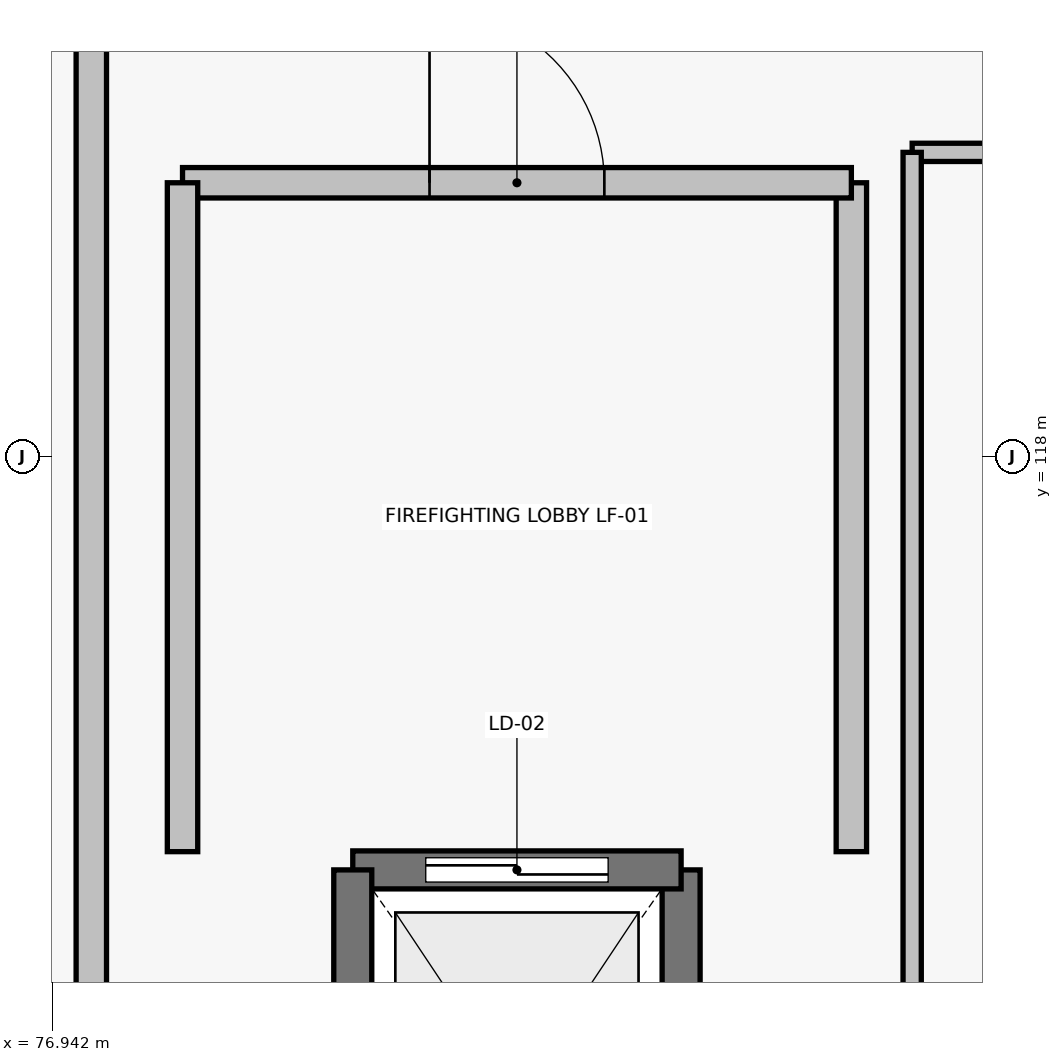
"""IFC4 building model, lengths in metres.
Left out: names, types, materials, properties, quantities, classifications, styles, units other than length and angle.
Written with IfcOpenShell. Run it as: python <this file> out.ifc"""

import sys

from ifc_helpers import new_model, si_unit, direction, frame, frame_2d, origin, place, context, subcontext, project, spatial, rectangle, extrude, element, fill, save


model = new_model("IFC4")
c1 = context("Model", 3, precision=1e-05, world=origin(), true_north=direction((0.0, 1.0)))
c2 = subcontext(c1, "Body", "Model", "MODEL_VIEW")
j1 = project(units=[si_unit("LENGTHUNIT", "METRE"), si_unit("PLANEANGLEUNIT", "RADIAN")], contexts=[c1])
p1 = place(None, origin())
s1 = spatial("IfcSite", under=j1, at=p1, CompositionType="ELEMENT")
p2 = place(p1, origin())
s2 = spatial("IfcBuilding", under=s1, at=p2, CompositionType="ELEMENT")
p3 = place(p2, origin())
s3 = spatial("IfcBuildingStorey", under=s2, at=p3, CompositionType="ELEMENT", Elevation=0.0)
p4 = place(p3, frame((81.08, 112.32, 0.0), z_axis=(0.0, 0.0, 1.0), x_axis=(0.0, 1.0, 0.0)))
e1 = element("IfcWall", 1, at=p4, inside=s3, PredefinedType="SHEAR", context=c2, shape_type="SweptSolid", body=[
    extrude(rectangle(XDim=2.96, YDim=0.25, at=frame_2d((1.48, 0.0))), origin(), (0.0, 0.0, 1.0), 5.16),
])
p5 = place(p3, frame((81.08, 115.28, 0.0), z_axis=(0.0, 0.0, 1.0), x_axis=(-1.0, 0.0, 0.0)))
e2 = element("IfcWall", 2, at=p5, inside=s3, PredefinedType="SHEAR", context=c2, shape_type="SweptSolid", body=[
    extrude(rectangle(XDim=2.16, YDim=0.25, at=frame_2d((1.08, 0.0))), origin(), (0.0, 0.0, 1.0), 5.16),
])
p6 = place(p5, frame((0.48, 0.0, 0.0)))
e3 = element("IfcOpeningElement", 3, at=p6, cuts=e2, PredefinedType="OPENING", context=c2, shape_type="SweptSolid", body=[
    extrude(rectangle(XDim=1.2, YDim=2.2, at=frame_2d((0.6, 1.1))), frame((0.0, 0.135, 0.0), z_axis=(0.0, -1.0, 0.0), x_axis=(1.0, 0.0, 0.0)), (0.0, 0.0, 1.0), 0.27),
])
p7 = place(p3, frame((78.92, 115.28, 0.0), z_axis=(0.0, 0.0, 1.0), x_axis=(0.0, -1.0, 0.0)))
e4 = element("IfcWall", 4, at=p7, inside=s3, PredefinedType="SHEAR", context=c2, shape_type="SweptSolid", body=[
    extrude(rectangle(XDim=2.96, YDim=0.25, at=frame_2d((1.48, 0.0))), origin(), (0.0, 0.0, 1.0), 5.16),
])
p8 = place(p3, frame((82.2, 115.4, 0.0), z_axis=(0.0, 0.0, 1.0), x_axis=(0.0, 1.0, 0.0)))
e5 = element("IfcWall", 5, at=p8, inside=s3, PredefinedType="PARTITIONING", context=c2, shape_type="SweptSolid", body=[
    extrude(rectangle(XDim=4.4, YDim=0.2, at=frame_2d((2.2, 0.0))), origin(), (0.0, 0.0, 1.0), 5.16),
])
p9 = place(p3, frame((82.2, 119.8, 0.0), z_axis=(0.0, 0.0, 1.0), x_axis=(-1.0, 0.0, 0.0)))
e6 = element("IfcWall", 6, at=p9, inside=s3, PredefinedType="PARTITIONING", context=c2, shape_type="SweptSolid", body=[
    extrude(rectangle(XDim=4.4, YDim=0.2, at=frame_2d((2.2, 0.0))), origin(), (0.0, 0.0, 1.0), 5.16),
])
p10 = place(p9, frame((1.625, 0.0, 0.0)))
e7 = element("IfcOpeningElement", 7, at=p10, cuts=e6, PredefinedType="OPENING", context=c2, shape_type="SweptSolid", body=[
    extrude(rectangle(XDim=1.15, YDim=2.2, at=frame_2d((0.575, 1.1))), frame((0.0, 0.11, 0.0), z_axis=(0.0, -1.0, 0.0), x_axis=(1.0, 0.0, 0.0)), (0.0, 0.0, 1.0), 0.22),
])
p11 = place(p3, frame((77.8, 119.8, 0.0), z_axis=(0.0, 0.0, 1.0), x_axis=(0.0, -1.0, 0.0)))
e8 = element("IfcWall", 8, at=p11, inside=s3, PredefinedType="PARTITIONING", context=c2, shape_type="SweptSolid", body=[
    extrude(rectangle(XDim=4.4, YDim=0.2, at=frame_2d((2.2, 0.0))), origin(), (0.0, 0.0, 1.0), 4.795),
])
p12 = place(p3, frame((77.2, 109.6, 0.0), z_axis=(0.0, 0.0, 1.0), x_axis=(0.0, 1.0, 0.0)))
e9 = element("IfcWall", 9, at=p12, inside=s3, PredefinedType="PARTITIONING", context=c2, shape_type="SweptSolid", body=[
    extrude(rectangle(XDim=23.38, YDim=0.2, at=frame_2d((11.69, 0.0))), origin(), (0.0, 0.0, 1.0), 4.795),
])
p13 = place(p12, frame((11.2, 0.0, 0.0)))
e10 = element("IfcOpeningElement", 10, at=p13, cuts=e9, PredefinedType="OPENING", context=c2, shape_type="SweptSolid", body=[
    extrude(rectangle(XDim=1.4, YDim=2.2, at=frame_2d((0.7, 1.1))), frame((0.0, 0.11, 0.0), z_axis=(0.0, -1.0, 0.0), x_axis=(1.0, 0.0, 0.0)), (0.0, 0.0, 1.0), 0.22),
])
p14 = place(p3, frame((89.8, 120.0, 0.0), z_axis=(0.0, 0.0, 1.0), x_axis=(-1.0, 0.0, 0.0)))
e11 = element("IfcWall", 11, at=p14, inside=s3, PredefinedType="PARTITIONING", context=c2, shape_type="SweptSolid", body=[
    extrude(rectangle(XDim=7.2, YDim=0.12, at=frame_2d((3.6, 0.0))), origin(), (0.0, 0.0, 1.0), 5.16),
])
p15 = place(p14, frame((3.21, 0.0, 0.0)))
e12 = element("IfcOpeningElement", 12, at=p15, cuts=e11, PredefinedType="OPENING", context=c2, shape_type="SweptSolid", body=[
    extrude(rectangle(XDim=1.18, YDim=2.18, at=frame_2d((0.59, 1.09))), frame((0.0, 0.07, 0.0), z_axis=(0.0, -1.0, 0.0), x_axis=(1.0, 0.0, 0.0)), (0.0, 0.0, 1.0), 0.14),
])
p16 = place(p3, frame((82.6, 120.0, 0.0), z_axis=(0.0, 0.0, 1.0), x_axis=(0.0, -1.0, 0.0)))
e13 = element("IfcWall", 13, at=p16, inside=s3, PredefinedType="PARTITIONING", context=c2, shape_type="SweptSolid", body=[
    extrude(rectangle(XDim=9.8, YDim=0.12, at=frame_2d((4.9, 0.0))), origin(), (0.0, 0.0, 1.0), 4.795),
])
p17 = place(p6, origin())
e14 = element("IfcDoor", 14, at=p17, inside=s3, OperationType="SLIDING_TO_RIGHT", PredefinedType="DOOR", context=c2, shape_type="SweptSolid", body=[
    extrude(rectangle(XDim=1.2, YDim=2.2, at=frame_2d((0.6, 1.1))), frame((0.0, 0.025, 0.0), z_axis=(0.0, -1.0, 0.0), x_axis=(1.0, 0.0, 0.0)), (0.0, 0.0, 1.0), 0.05),
])
fill(e3, e14)
p18 = place(p10, origin())
e15 = element("IfcDoor", 15, at=p18, inside=s3, OperationType="SINGLE_SWING_RIGHT", PredefinedType="DOOR", context=c2, shape_type="SweptSolid", body=[
    extrude(rectangle(XDim=1.15, YDim=2.2, at=frame_2d((0.575, 1.1))), frame((0.0, 0.025, 0.0), z_axis=(0.0, -1.0, 0.0), x_axis=(1.0, 0.0, 0.0)), (0.0, 0.0, 1.0), 0.05),
])
fill(e7, e15)
save(model, sys.argv[1])
